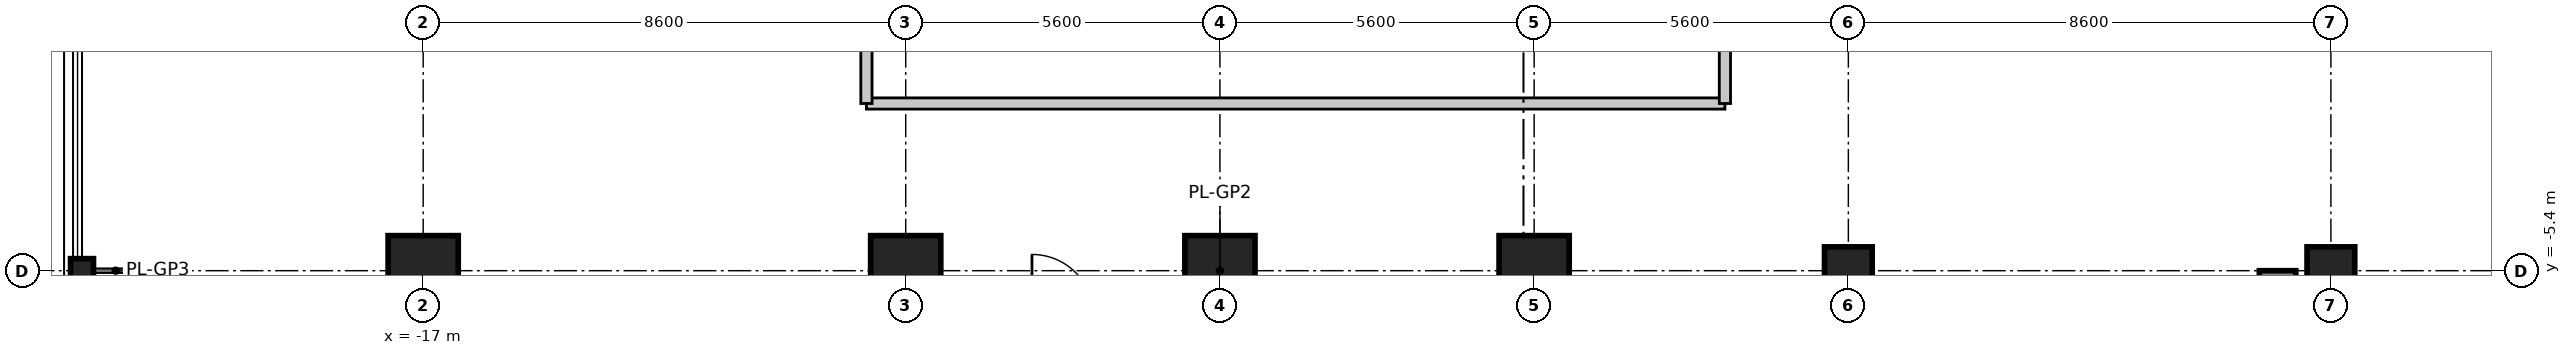
"""IFC4 building model, lengths in metres.
Left out: names, types, materials, properties, quantities, classifications, styles, units other than length and angle.
Written with IfcOpenShell. Run it as: python <this file> out.ifc"""

import sys

from ifc_helpers import new_model, si_unit, direction, frame, frame_2d, origin, origin_2d, place, context, subcontext, project, spatial, rectangle, i_section, extrude, source, transform, mapped, element, save


model = new_model("IFC4")
c1 = context("Model", 3, precision=1e-05, world=origin(), true_north=direction((0.0, 1.0)))
c2 = subcontext(c1, "Body", "Model", "MODEL_VIEW")
j1 = project(units=[si_unit("LENGTHUNIT", "METRE"), si_unit("PLANEANGLEUNIT", "RADIAN")], contexts=[c1])
p1 = place(None, origin())
s1 = spatial("IfcSite", under=j1, at=p1, CompositionType="ELEMENT")
p2 = place(p1, origin())
s2 = spatial("IfcBuilding", under=s1, at=p2, CompositionType="ELEMENT")
p3 = place(p2, frame((0.0, 0.0, 144.2)))
s3 = spatial("IfcBuildingStorey", under=s2, at=p3, CompositionType="ELEMENT", Elevation=144.2)
m1 = source(origin(), c2, "Body", "SweptSolid", [
    extrude(rectangle(XDim=1.25, YDim=1.25, at=origin_2d()), origin(), (0.0, 0.0, 1.0), 4.755),
])
for number, where, z_axis, x_axis in (
    (1, (-17.0, -5.4, 0.0), (0.0, 0.0, 1.0), (1.0, 0.0, 0.0)),
    (2, (-8.4, -5.4, 0.0), (0.0, 0.0, 1.0), (1.0, 0.0, 0.0)),
    (3, (-2.8, -5.4, 0.0), (0.0, 0.0, 1.0), (1.0, 0.0, 0.0)),
    (4, (2.8, -5.4, 0.0), (0.0, 0.0, 1.0), (1.0, 0.0, 0.0)),
):
    element("IfcColumn", number, at=place(p3, frame(where, z_axis=z_axis, x_axis=x_axis)), inside=s3, PredefinedType="COLUMN", context=c2, shape_type="MappedRepresentation", body=[
        mapped(m1, transform((0.0, 0.0, 0.0), scale=1.0)),
    ])
m2 = source(origin(), c2, "Body", "SweptSolid", [
    extrude(rectangle(XDim=0.85, YDim=0.85, at=origin_2d()), origin(), (0.0, 0.0, 1.0), 4.755),
])
for number, where, z_axis, x_axis in (
    (5, (8.4, -5.4, 0.0), (0.0, 0.0, 1.0), (1.0, 0.0, 0.0)),
    (6, (17.0, -5.4, 0.0), (0.0, 0.0, 1.0), (1.0, 0.0, 0.0)),
):
    element("IfcColumn", number, at=place(p3, frame(where, z_axis=z_axis, x_axis=x_axis)), inside=s3, PredefinedType="PILASTER", context=c2, shape_type="MappedRepresentation", body=[
        mapped(m2, transform((0.0, 0.0, 0.0), scale=1.0)),
    ])
m3 = source(origin(), c2, "Body", "SweptSolid", [
    extrude(i_section(OverallWidth=0.409, OverallDepth=0.43, WebThickness=0.021, FlangeThickness=0.034, at=origin_2d()), origin(), (0.0, 0.0, 1.0), 4.694),
])
p4 = place(p3, frame((-23.08, -5.4, 0.0), z_axis=(0.127855804376, 0.0, 0.991792767309), x_axis=(0.0, 1.0, 0.0)))
e7 = element("IfcColumn", 7, at=p4, inside=s3, PredefinedType="COLUMN", context=c2, shape_type="MappedRepresentation", body=[
    mapped(m3, transform((0.0, 0.0, 0.0), scale=1.0)),
])
m4 = source(origin(), c2, "Body", "SweptSolid", [
    extrude(rectangle(XDim=11.6, YDim=0.65, at=frame_2d((5.8, 0.0))), origin(), (0.0, 0.0, 1.0), 4.54),
])
p5 = place(p3, frame((16.05, -17.0, 0.0), z_axis=(0.0, 0.0, 1.0), x_axis=(0.0, 1.0, 0.0)))
e8 = element("IfcWall", 8, at=p5, inside=s3, PredefinedType="SHEAR", context=c2, shape_type="MappedRepresentation", body=[
    mapped(m4, transform((0.0, 0.0, 0.0), scale=1.0)),
])
m5 = source(origin(), c2, "Body", "SweptSolid", [
    extrude(rectangle(XDim=15.3, YDim=0.2, at=frame_2d((7.65, 0.0))), origin(), (0.0, 0.0, 1.0), 3.4),
])
p6 = place(p3, frame((-9.1, -2.42, 0.0), z_axis=(0.0, 0.0, 1.0), x_axis=(1.0, 0.0, 0.0)))
e9 = element("IfcWall", 9, at=p6, inside=s3, PredefinedType="PARTITIONING", context=c2, shape_type="MappedRepresentation", body=[
    mapped(m5, transform((0.0, 0.0, 0.0), scale=1.0)),
])
m6 = source(origin(), c2, "Body", "SweptSolid", [
    extrude(rectangle(XDim=4.84, YDim=0.2, at=frame_2d((2.42, 0.0))), origin(), (0.0, 0.0, 1.0), 3.4),
])
for number, where, z_axis, x_axis in (
    (10, (-9.1, -2.42, 0.0), (0.0, 0.0, 1.0), (0.0, 1.0, 0.0)),
    (11, (6.2, -2.42, 0.0), (0.0, 0.0, 1.0), (0.0, 1.0, 0.0)),
):
    element("IfcWall", number, at=place(p3, frame(where, z_axis=z_axis, x_axis=x_axis)), inside=s3, PredefinedType="PARTITIONING", context=c2, shape_type="MappedRepresentation", body=[
        mapped(m6, transform((0.0, 0.0, 0.0), scale=1.0)),
    ])
save(model, sys.argv[1])
